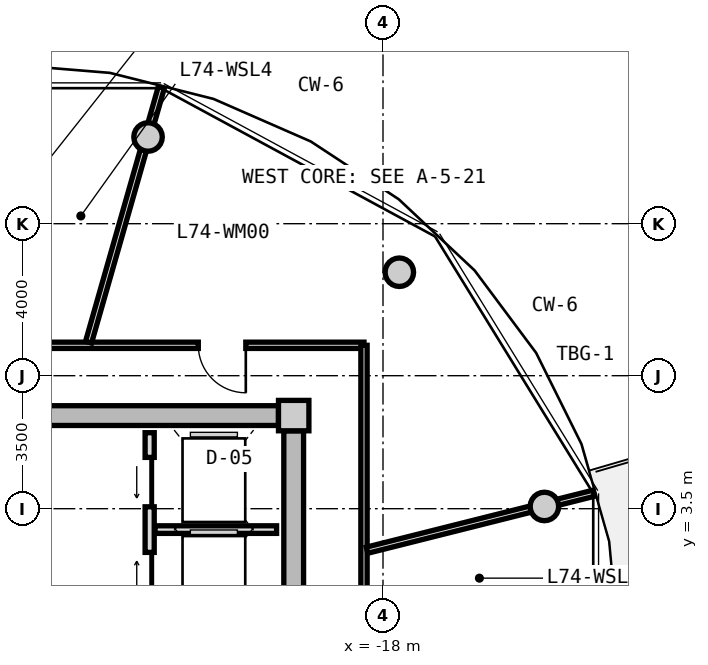
"""IFC4 building model, lengths in metres.
Left out: names, types, materials, properties, quantities, classifications, styles, units other than length and angle.
Written with IfcOpenShell. Run it as: python <this file> out.ifc"""

import sys

from ifc_helpers import new_model, si_unit, direction, frame, frame_2d, origin, origin_2d, place, context, subcontext, project, spatial, rectangle, circle, extrude, source, transform, mapped, element, fill, save


model = new_model("IFC4")
c1 = context("Model", 3, precision=1e-05, world=origin(), true_north=direction((0.0, 1.0)))
c2 = subcontext(c1, "Body", "Model", "MODEL_VIEW")
j1 = project(units=[si_unit("LENGTHUNIT", "METRE"), si_unit("PLANEANGLEUNIT", "RADIAN")], contexts=[c1])
p1 = place(None, origin())
s1 = spatial("IfcSite", under=j1, at=p1, CompositionType="ELEMENT")
p2 = place(p1, origin())
s2 = spatial("IfcBuilding", under=s1, at=p2, CompositionType="ELEMENT")
p3 = place(p2, frame((0.0, 0.0, 238.3)))
s3 = spatial("IfcBuildingStorey", under=s2, at=p3, CompositionType="ELEMENT", Elevation=238.3)
m1 = source(origin(), c2, "Body", "SweptSolid", [
    extrude(rectangle(XDim=0.8, YDim=0.8, at=origin_2d()), origin(), (0.0, 0.0, 1.0), 3.05),
])
p4 = place(p3, frame((-20.35, 5.95, 0.0), z_axis=(0.0, 0.0, 1.0), x_axis=(1.0, 0.0, 0.0)))
e1 = element("IfcColumn", 1, at=p4, inside=s3, PredefinedType="COLUMN", context=c2, shape_type="MappedRepresentation", body=[
    mapped(m1, transform((0.0, 0.0, 0.0), x_axis=(1.0, 0.0, 0.0), y_axis=(0.0, 1.0, 0.0), z_axis=(0.0, 0.0, 1.0), scale=1.0)),
])
m2 = source(origin(), c2, "Body", "SweptSolid", [
    extrude(rectangle(XDim=14.5, YDim=0.52, at=frame_2d((7.25, 0.0))), origin(), (0.0, 0.0, 1.0), 2.81),
])
p5 = place(p3, frame((-35.25, 5.95, 0.0), z_axis=(0.0, 0.0, 1.0), x_axis=(1.0, 0.0, 0.0)))
e2 = element("IfcWall", 2, at=p5, inside=s3, PredefinedType="SHEAR", context=c2, shape_type="MappedRepresentation", body=[
    mapped(m2, transform((0.0, 0.0, 0.0), x_axis=(1.0, 0.0, 0.0), y_axis=(0.0, 1.0, 0.0), z_axis=(0.0, 0.0, 1.0), scale=1.0)),
])
m3 = source(origin(), c2, "Body", "SweptSolid", [
    extrude(rectangle(XDim=11.1, YDim=0.52, at=frame_2d((5.55, 0.0))), origin(), (0.0, 0.0, 1.0), 2.81),
])
p6 = place(p3, frame((-20.35, 5.55, 0.0), z_axis=(0.0, 0.0, 1.0), x_axis=(0.0, -1.0, 0.0)))
e3 = element("IfcWall", 3, at=p6, inside=s3, PredefinedType="SHEAR", context=c2, shape_type="MappedRepresentation", body=[
    mapped(m3, transform((0.0, 0.0, 0.0), x_axis=(1.0, 0.0, 0.0), y_axis=(0.0, 1.0, 0.0), z_axis=(0.0, 0.0, 1.0), scale=1.0)),
])
p7 = place(p6, frame((5.65, 0.0, 0.0)))
e4 = element("IfcOpeningElement", 4, at=p7, cuts=e3, PredefinedType="OPENING", context=c2, shape_type="SweptSolid", body=[
    extrude(rectangle(XDim=1.2, YDim=2.15, at=frame_2d((0.6, 1.075))), frame((0.0, 0.27, 0.0), z_axis=(0.0, -1.0, 0.0), x_axis=(1.0, 0.0, 0.0)), (0.0, 0.0, 1.0), 0.54),
])
m4 = source(origin(), c2, "Body", "SweptSolid", [
    extrude(circle(Radius=0.375, at=origin_2d()), origin(), (0.0, 0.0, 1.0), 3.05),
])
for number, where, z_axis, x_axis in (
    (5, (-13.753, 3.559, 0.0), (0.0, 0.0, 1.0), (1.0, 0.0, 0.0)),
    (6, (-17.57, 9.723, 0.0), (0.0, 0.0, 1.0), (1.0, 0.0, 0.0)),
    (7, (-24.182, 13.281, 0.0), (0.0, 0.0, 1.0), (1.0, 0.0, 0.0)),
):
    element("IfcColumn", number, at=place(p3, frame(where, z_axis=z_axis, x_axis=x_axis)), inside=s3, PredefinedType="COLUMN", context=c2, shape_type="MappedRepresentation", body=[
        mapped(m4, transform((0.0, 0.0, 0.0), x_axis=(1.0, 0.0, 0.0), y_axis=(0.0, 1.0, 0.0), z_axis=(0.0, 0.0, 1.0), scale=1.0)),
    ])
m5 = source(origin(), c2, "Body", "SweptSolid", [
    extrude(rectangle(XDim=5.0, YDim=0.24, at=frame_2d((2.5, 0.0))), origin(), (0.0, 0.0, 1.0), 2.795),
])
p8 = place(p3, frame((-24.14, 0.5, 0.0), z_axis=(0.0, 0.0, 1.0), x_axis=(0.0, 1.0, 0.0)))
e8 = element("IfcWall", 8, at=p8, inside=s3, PredefinedType="PARTITIONING", context=c2, shape_type="MappedRepresentation", body=[
    mapped(m5, transform((0.0, 0.0, 0.0), x_axis=(1.0, 0.0, 0.0), y_axis=(0.0, 1.0, 0.0), z_axis=(0.0, 0.0, 1.0), scale=1.0)),
])
p9 = place(p8, frame((3.05, 0.0, 0.0)))
e9 = element("IfcOpeningElement", 9, at=p9, cuts=e8, PredefinedType="OPENING", context=c2, shape_type="SweptSolid", body=[
    extrude(rectangle(XDim=1.3, YDim=2.2, at=frame_2d((0.65, 1.1))), frame((0.0, 0.13, 0.0), z_axis=(0.0, -1.0, 0.0), x_axis=(1.0, 0.0, 0.0)), (0.0, 0.0, 1.0), 0.26),
])
p10 = place(p8, frame((0.55, 0.0, 0.0)))
e10 = element("IfcOpeningElement", 10, at=p10, cuts=e8, PredefinedType="OPENING", context=c2, shape_type="SweptSolid", body=[
    extrude(rectangle(XDim=1.3, YDim=2.2, at=frame_2d((0.65, 1.1))), frame((0.0, 0.13, 0.0), z_axis=(0.0, -1.0, 0.0), x_axis=(1.0, 0.0, 0.0)), (0.0, 0.0, 1.0), 0.26),
])
m6 = source(origin(), c2, "Body", "SweptSolid", [
    extrude(rectangle(XDim=3.2, YDim=0.2, at=frame_2d((1.6, 0.0))), origin(), (0.0, 0.0, 1.0), 2.795),
])
p11 = place(p3, frame((-24.0, 2.95, 0.0), z_axis=(0.0, 0.0, 1.0), x_axis=(1.0, 0.0, 0.0)))
e11 = element("IfcWall", 11, at=p11, inside=s3, PredefinedType="PARTITIONING", context=c2, shape_type="MappedRepresentation", body=[
    mapped(m6, transform((0.0, 0.0, 0.0), x_axis=(1.0, 0.0, 0.0), y_axis=(0.0, 1.0, 0.0), z_axis=(0.0, 0.0, 1.0), scale=1.0)),
])
m7 = source(origin(), c2, "Body", "SweptSolid", [
    extrude(rectangle(XDim=8.58, YDim=0.165, at=frame_2d((4.29, 0.0))), origin(), (0.0, 0.0, 1.0), 2.795),
])
p12 = place(p3, frame((-27.08, 7.8, 0.0), z_axis=(0.0, 0.0, 1.0), x_axis=(1.0, 0.0, 0.0)))
e12 = element("IfcWall", 12, at=p12, inside=s3, PredefinedType="PARTITIONING", context=c2, shape_type="MappedRepresentation", body=[
    mapped(m7, transform((0.0, 0.0, 0.0), x_axis=(1.0, 0.0, 0.0), y_axis=(0.0, 1.0, 0.0), z_axis=(0.0, 0.0, 1.0), scale=1.0)),
])
p13 = place(p12, frame((4.22, 0.0, 0.0)))
e13 = element("IfcOpeningElement", 13, at=p13, cuts=e12, PredefinedType="OPENING", context=c2, shape_type="SweptSolid", body=[
    extrude(rectangle(XDim=1.25, YDim=2.2, at=frame_2d((0.625, 1.1))), frame((0.0, 0.093, 0.0), z_axis=(0.0, -1.0, 0.0), x_axis=(1.0, 0.0, 0.0)), (0.0, 0.0, 1.0), 0.185),
])
m8 = source(origin(), c2, "Body", "SweptSolid", [
    extrude(rectangle(XDim=6.88, YDim=0.165, at=frame_2d((3.44, 0.0))), origin(), (0.0, 0.0, 1.0), 2.795),
])
p14 = place(p3, frame((-18.5, 7.8, 0.0), z_axis=(0.0, 0.0, 1.0), x_axis=(0.0, -1.0, 0.0)))
e14 = element("IfcWall", 14, at=p14, inside=s3, PredefinedType="PARTITIONING", context=c2, shape_type="MappedRepresentation", body=[
    mapped(m8, transform((0.0, 0.0, 0.0), x_axis=(1.0, 0.0, 0.0), y_axis=(0.0, 1.0, 0.0), z_axis=(0.0, 0.0, 1.0), scale=1.0)),
])
m9 = source(origin(), c2, "Body", "SweptSolid", [
    extrude(rectangle(XDim=6.974, YDim=0.165, at=frame_2d((3.487, 0.0))), origin(), (0.0, 0.0, 1.0), 2.395),
])
p15 = place(p3, frame((-25.749, 7.88, 0.0), z_axis=(0.0, 0.0, 1.0), x_axis=(0.274707256801, 0.961527910703, 0.0)))
e15 = element("IfcWall", 15, at=p15, inside=s3, PredefinedType="PARTITIONING", context=c2, shape_type="MappedRepresentation", body=[
    mapped(m9, transform((0.0, 0.0, 0.0), x_axis=(1.0, 0.0, 0.0), y_axis=(0.0, 1.0, 0.0), z_axis=(0.0, 0.0, 1.0), scale=1.0)),
])
m10 = source(origin(), c2, "Body", "SweptSolid", [
    extrude(rectangle(XDim=6.157, YDim=0.165, at=frame_2d((3.079, 0.0))), origin(), (0.0, 0.0, 1.0), 2.395),
])
p16 = place(p3, frame((-18.42, 2.407, 0.0), z_axis=(0.0, 0.0, 1.0), x_axis=(0.969840867184, 0.243738984038, 0.0)))
e16 = element("IfcWall", 16, at=p16, inside=s3, PredefinedType="PARTITIONING", context=c2, shape_type="MappedRepresentation", body=[
    mapped(m10, transform((0.0, 0.0, 0.0), x_axis=(1.0, 0.0, 0.0), y_axis=(0.0, 1.0, 0.0), z_axis=(0.0, 0.0, 1.0), scale=1.0)),
])
m11 = source(origin(), c2, "Body", "SweptSolid", [
    extrude(rectangle(XDim=1.3, YDim=2.2, at=frame_2d((0.65, 1.1))), frame((0.0, 0.025, 0.0), z_axis=(0.0, -1.0, 0.0), x_axis=(1.0, 0.0, 0.0)), (0.0, 0.0, 1.0), 0.05),
])
p17 = place(p9, origin())
e17 = element("IfcDoor", 17, at=p17, inside=s3, OperationType="SLIDING_TO_LEFT", PredefinedType="DOOR", context=c2, shape_type="MappedRepresentation", body=[
    mapped(m11, transform((0.0, 0.0, 0.0), x_axis=(1.0, 0.0, 0.0), y_axis=(0.0, 1.0, 0.0), z_axis=(0.0, 0.0, 1.0), scale=1.0)),
])
fill(e9, e17)
p18 = place(p10, origin())
e18 = element("IfcDoor", 18, at=p18, inside=s3, OperationType="SLIDING_TO_RIGHT", PredefinedType="DOOR", context=c2, shape_type="MappedRepresentation", body=[
    mapped(m11, transform((0.0, 0.0, 0.0), x_axis=(1.0, 0.0, 0.0), y_axis=(0.0, 1.0, 0.0), z_axis=(0.0, 0.0, 1.0), scale=1.0)),
])
fill(e10, e18)
m12 = source(origin(), c2, "Body", "SweptSolid", [
    extrude(rectangle(XDim=1.25, YDim=2.2, at=frame_2d((0.625, 1.1))), frame((0.0, 0.025, 0.0), z_axis=(0.0, -1.0, 0.0), x_axis=(1.0, 0.0, 0.0)), (0.0, 0.0, 1.0), 0.05),
])
p19 = place(p13, frame((1.25, 0.0, 0.0), z_axis=(0.0, 0.0, 1.0), x_axis=(-1.0, 0.0, 0.0)))
e19 = element("IfcDoor", 19, at=p19, inside=s3, OperationType="SINGLE_SWING_LEFT", PredefinedType="DOOR", context=c2, shape_type="MappedRepresentation", body=[
    mapped(m12, transform((0.0, 0.0, 0.0), x_axis=(1.0, 0.0, 0.0), y_axis=(0.0, 1.0, 0.0), z_axis=(0.0, 0.0, 1.0), scale=1.0)),
])
fill(e13, e19)
save(model, sys.argv[1])
